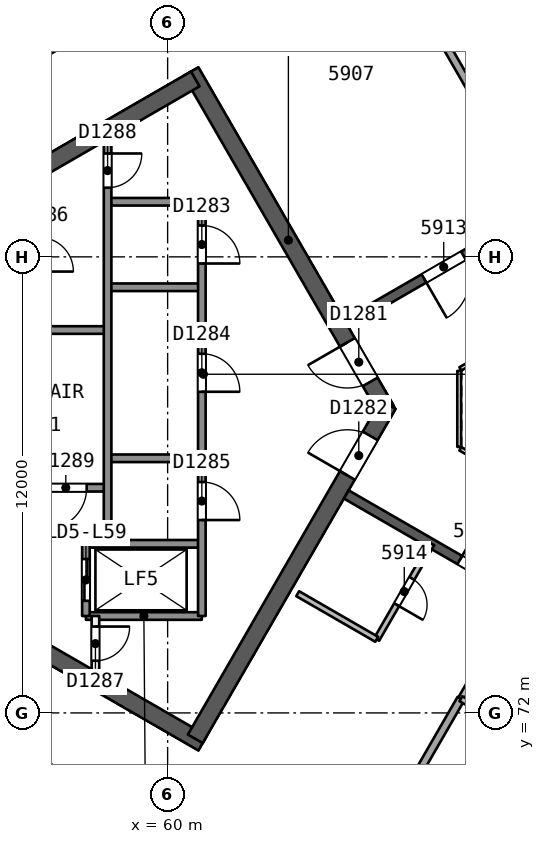
"""IFC4 building model, lengths in metres.
Left out: names, types, materials, properties, quantities, classifications, styles, units other than length and angle.
Written with IfcOpenShell. Run it as: python <this file> out.ifc"""

import sys

from ifc_helpers import new_model, si_unit, direction, frame, frame_2d, origin, place, context, subcontext, project, spatial, rectangle, extrude, element, fill, save


model = new_model("IFC4")
c1 = context("Model", 3, precision=1e-05, world=origin(), true_north=direction((0.0, 1.0)))
c2 = subcontext(c1, "Body", "Model", "MODEL_VIEW")
j1 = project(units=[si_unit("LENGTHUNIT", "METRE"), si_unit("PLANEANGLEUNIT", "RADIAN")], contexts=[c1])
p1 = place(None, origin())
s1 = spatial("IfcSite", under=j1, at=p1, CompositionType="ELEMENT")
p2 = place(p1, origin())
s2 = spatial("IfcBuilding", under=s1, at=p2, CompositionType="ELEMENT")
p3 = place(p2, frame((0.0, 0.0, 239.1)))
s3 = spatial("IfcBuildingStorey", under=s2, at=p3, CompositionType="ELEMENT", Elevation=239.1)
p4 = place(p3, frame((65.74, 80.0, 0.0), z_axis=(0.0, 0.0, 1.0), x_axis=(-0.499991857942, 0.866030104553, 0.0)))
e1 = element("IfcWall", 1, at=p4, inside=s3, PredefinedType="SHEAR", context=c2, shape_type="SweptSolid", body=[
    extrude(rectangle(XDim=10.25, YDim=0.45, at=frame_2d((5.125, 0.0))), origin(), (0.0, 0.0, 1.0), 3.7),
])
p5 = place(p4, frame((0.82, 0.0, 0.0)))
e2 = element("IfcOpeningElement", 2, at=p5, cuts=e1, PredefinedType="OPENING", context=c2, shape_type="SweptSolid", body=[
    extrude(rectangle(XDim=1.2, YDim=2.1, at=frame_2d((0.6, 1.05))), frame((0.0, 0.235, 0.0), z_axis=(0.0, -1.0, 0.0), x_axis=(1.0, 0.0, 0.0)), (0.0, 0.0, 1.0), 0.471),
])
p6 = place(p3, frame((60.728, 88.682, 0.0), z_axis=(0.0, 0.0, 1.0), x_axis=(-0.866021613849, -0.500006564303, 0.0)))
e3 = element("IfcWall", 3, at=p6, inside=s3, PredefinedType="SHEAR", context=c2, shape_type="SweptSolid", body=[
    extrude(rectangle(XDim=14.108, YDim=0.45, at=frame_2d((7.054, 0.0))), origin(), (0.0, 0.0, 1.0), 3.7),
])
p7 = place(p3, frame((48.622, 78.307, 0.0), z_axis=(0.0, 0.0, 1.0), x_axis=(0.86602701116, -0.499997215934, 0.0)))
e4 = element("IfcWall", 4, at=p7, inside=s3, PredefinedType="SHEAR", context=c2, shape_type="SweptSolid", body=[
    extrude(rectangle(XDim=14.204, YDim=0.45, at=frame_2d((7.102, 0.0))), origin(), (0.0, 0.0, 1.0), 3.7),
])
p8 = place(p3, frame((60.728, 71.318, 0.0), z_axis=(0.0, 0.0, 1.0), x_axis=(0.500012416173, 0.866018235185, 0.0)))
e5 = element("IfcWall", 5, at=p8, inside=s3, PredefinedType="SHEAR", context=c2, shape_type="SweptSolid", body=[
    extrude(rectangle(XDim=10.155, YDim=0.45, at=frame_2d((5.078, 0.0))), origin(), (0.0, 0.0, 1.0), 3.7),
])
p9 = place(p8, frame((8.005, 0.0, 0.0)))
e6 = element("IfcOpeningElement", 6, at=p9, cuts=e5, PredefinedType="OPENING", context=c2, shape_type="SweptSolid", body=[
    extrude(rectangle(XDim=1.2, YDim=2.1, at=frame_2d((0.6, 1.05))), frame((0.0, 0.235, 0.0), z_axis=(0.0, -1.0, 0.0), x_axis=(1.0, 0.0, 0.0)), (0.0, 0.0, 1.0), 0.471),
])
p10 = place(p3, frame((78.2, 90.046, 0.0), z_axis=(0.0, 0.0, 1.0), x_axis=(-0.866026492143, -0.499998114903, 0.0)))
e7 = element("IfcWall", 7, at=p10, inside=s3, PredefinedType="SHEAR", context=c2, shape_type="SweptSolid", body=[
    extrude(rectangle(XDim=15.588, YDim=0.25, at=frame_2d((7.794, 0.0))), origin(), (0.0, 0.0, 1.0), 3.3),
])
p11 = place(p10, frame((3.606, 0.0, 0.0)))
e8 = element("IfcOpeningElement", 8, at=p11, cuts=e7, PredefinedType="OPENING", context=c2, shape_type="SweptSolid", body=[
    extrude(rectangle(XDim=1.0, YDim=2.1, at=frame_2d((0.5, 1.05))), frame((0.0, 0.135, 0.0), z_axis=(0.0, -1.0, 0.0), x_axis=(1.0, 0.0, 0.0)), (0.0, 0.0, 1.0), 0.271),
])
p12 = place(p10, frame((8.315, 0.0, 0.0)))
e9 = element("IfcOpeningElement", 9, at=p12, cuts=e7, PredefinedType="OPENING", context=c2, shape_type="SweptSolid", body=[
    extrude(rectangle(XDim=1.1, YDim=2.1, at=frame_2d((0.55, 1.05))), frame((0.0, 0.135, 0.0), z_axis=(0.0, -1.0, 0.0), x_axis=(1.0, 0.0, 0.0)), (0.0, 0.0, 1.0), 0.271),
])
p13 = place(p10, frame((12.027, 0.0, 0.0)))
e10 = element("IfcOpeningElement", 10, at=p13, cuts=e7, PredefinedType="OPENING", context=c2, shape_type="SweptSolid", body=[
    extrude(rectangle(XDim=1.2, YDim=2.4, at=frame_2d((0.6, 1.2))), frame((0.0, 0.135, 0.0), z_axis=(0.0, -1.0, 0.0), x_axis=(1.0, 0.0, 0.0)), (0.0, 0.0, 1.0), 0.271),
])
p14 = place(p3, frame((64.7, 77.748, 0.0), z_axis=(0.0, 0.0, 1.0), x_axis=(0.866026492143, -0.499998114903, 0.0)))
e11 = element("IfcWall", 11, at=p14, inside=s3, PredefinedType="SHEAR", context=c2, shape_type="SweptSolid", body=[
    extrude(rectangle(XDim=15.588, YDim=0.25, at=frame_2d((7.794, 0.0))), origin(), (0.0, 0.0, 1.0), 3.3),
])
p15 = place(p14, frame((3.45, 0.0, 0.0)))
e12 = element("IfcOpeningElement", 12, at=p15, cuts=e11, PredefinedType="OPENING", context=c2, shape_type="SweptSolid", body=[
    extrude(rectangle(XDim=1.0, YDim=2.1, at=frame_2d((0.5, 1.05))), frame((0.0, 0.135, 0.0), z_axis=(0.0, -1.0, 0.0), x_axis=(1.0, 0.0, 0.0)), (0.0, 0.0, 1.0), 0.271),
])
p16 = place(p14, frame((8.315, 0.0, 0.0)))
e13 = element("IfcOpeningElement", 13, at=p16, cuts=e11, PredefinedType="OPENING", context=c2, shape_type="SweptSolid", body=[
    extrude(rectangle(XDim=1.1, YDim=2.1, at=frame_2d((0.55, 1.05))), frame((0.0, 0.135, 0.0), z_axis=(0.0, -1.0, 0.0), x_axis=(1.0, 0.0, 0.0)), (0.0, 0.0, 1.0), 0.271),
])
p17 = place(p14, frame((10.827, 0.0, 0.0)))
e14 = element("IfcOpeningElement", 14, at=p17, cuts=e11, PredefinedType="OPENING", context=c2, shape_type="SweptSolid", body=[
    extrude(rectangle(XDim=1.0, YDim=2.1, at=frame_2d((0.5, 1.05))), frame((0.0, 0.135, 0.0), z_axis=(0.0, -1.0, 0.0), x_axis=(1.0, 0.0, 0.0)), (0.0, 0.0, 1.0), 0.271),
])
p18 = place(p3, frame((64.815, 93.899, 0.0), z_axis=(0.0, 0.0, 1.0), x_axis=(0.50001112685, -0.866018979599, 0.0)))
e15 = element("IfcWall", 15, at=p18, inside=s3, PredefinedType="PARTITIONING", context=c2, shape_type="SweptSolid", body=[
    extrude(rectangle(XDim=10.03, YDim=0.2, at=frame_2d((5.015, 0.0))), origin(), (0.0, 0.0, 1.0), 3.3),
])
p19 = place(p3, frame((66.952, 76.448, 0.0), z_axis=(0.0, 0.0, 1.0), x_axis=(-0.499987231761, -0.866032775405, 0.0)))
e16 = element("IfcWall", 16, at=p19, inside=s3, PredefinedType="PARTITIONING", context=c2, shape_type="SweptSolid", body=[
    extrude(rectangle(XDim=2.9, YDim=0.15, at=frame_2d((1.45, 0.0))), origin(), (0.0, 0.0, 1.0), 3.3),
])
p20 = place(p19, frame((1.05, 0.0, 0.0)))
e17 = element("IfcOpeningElement", 17, at=p20, cuts=e16, PredefinedType="OPENING", context=c2, shape_type="SweptSolid", body=[
    extrude(rectangle(XDim=0.8, YDim=2.1, at=frame_2d((0.4, 1.05))), frame((0.0, 0.085, 0.0), z_axis=(0.0, -1.0, 0.0), x_axis=(1.0, 0.0, 0.0)), (0.0, 0.0, 1.0), 0.171),
])
p21 = place(p3, frame((65.502, 73.937, 0.0), z_axis=(0.0, 0.0, 1.0), x_axis=(-0.865994240961, 0.500053971709, 0.0)))
e18 = element("IfcWall", 18, at=p21, inside=s3, PredefinedType="PARTITIONING", context=c2, shape_type="SweptSolid", body=[
    extrude(rectangle(XDim=2.401, YDim=0.15, at=frame_2d((1.201, 0.0))), origin(), (0.0, 0.0, 1.0), 3.3),
])
p22 = place(p3, frame((64.275, 66.413, 0.0), z_axis=(0.0, 0.0, 1.0), x_axis=(0.500015178307, 0.866016640408, 0.0)))
e19 = element("IfcWall", 19, at=p22, inside=s3, PredefinedType="PARTITIONING", context=c2, shape_type="SweptSolid", body=[
    extrude(rectangle(XDim=6.883, YDim=0.2, at=frame_2d((3.441, 0.0))), origin(), (0.0, 0.0, 1.0), 3.3),
])
p23 = place(p3, frame((67.717, 72.373, 0.0), z_axis=(0.0, 0.0, 1.0), x_axis=(0.500002266011, 0.866024095498, 0.0)))
e20 = element("IfcWall", 20, at=p23, inside=s3, PredefinedType="PARTITIONING", context=c2, shape_type="SweptSolid", body=[
    extrude(rectangle(XDim=3.147, YDim=0.15, at=frame_2d((1.573, 0.0))), origin(), (0.0, 0.0, 1.0), 3.3),
])
p24 = place(p3, frame((70.111, 70.991, 0.0), z_axis=(0.0, 0.0, 1.0), x_axis=(-0.866050310653, 0.499956857557, 0.0)))
e21 = element("IfcWall", 21, at=p24, inside=s3, PredefinedType="PARTITIONING", context=c2, shape_type="SweptSolid", body=[
    extrude(rectangle(XDim=2.765, YDim=0.15, at=frame_2d((1.382, 0.0))), origin(), (0.0, 0.0, 1.0), 3.3),
])
p25 = place(p3, frame((44.845, 82.542, 0.0), z_axis=(0.0, 0.0, 1.0), x_axis=(0.866025459945, 0.499999902727, 0.0)))
e22 = element("IfcWall", 22, at=p25, inside=s3, PredefinedType="SOLIDWALL", context=c2, shape_type="SweptSolid", body=[
    extrude(rectangle(XDim=49.688, YDim=0.3, at=frame_2d((24.844, 0.0))), origin(), (0.0, 0.0, 1.0), 3.3),
])
p26 = place(p25, frame((23.8, 0.0, 0.0)))
e23 = element("IfcOpeningElement", 23, at=p26, cuts=e22, PredefinedType="OPENING", context=c2, shape_type="SweptSolid", body=[
    extrude(rectangle(XDim=2.4, YDim=2.4, at=frame_2d((1.2, 1.2))), frame((0.0, 0.161, 0.0), z_axis=(0.0, -1.0, 0.0), x_axis=(1.0, 0.0, 0.0)), (0.0, 0.0, 1.0), 0.321),
])
p27 = place(p25, frame((10.243, 0.0, 0.0)))
e24 = element("IfcOpeningElement", 24, at=p27, cuts=e22, PredefinedType="OPENING", context=c2, shape_type="SweptSolid", body=[
    extrude(rectangle(XDim=2.4, YDim=2.4, at=frame_2d((1.2, 1.2))), frame((0.0, 0.161, 0.0), z_axis=(0.0, -1.0, 0.0), x_axis=(1.0, 0.0, 0.0)), (0.0, 0.0, 1.0), 0.321),
])
p28 = place(p25, frame((37.201, 0.0, 0.0)))
e25 = element("IfcOpeningElement", 25, at=p28, cuts=e22, PredefinedType="OPENING", context=c2, shape_type="SweptSolid", body=[
    extrude(rectangle(XDim=2.4, YDim=2.4, at=frame_2d((1.2, 1.2))), frame((0.0, 0.161, 0.0), z_axis=(0.0, -1.0, 0.0), x_axis=(1.0, 0.0, 0.0)), (0.0, 0.0, 1.0), 0.321),
])
p29 = place(p3, frame((87.876, 52.614, 0.0), z_axis=(0.0, 0.0, 1.0), x_axis=(-0.866025459945, 0.499999902727, 0.0)))
e26 = element("IfcWall", 26, at=p29, inside=s3, PredefinedType="SOLIDWALL", context=c2, shape_type="SweptSolid", body=[
    extrude(rectangle(XDim=49.688, YDim=0.3, at=frame_2d((24.844, 0.0))), origin(), (0.0, 0.0, 1.0), 3.3),
])
p30 = place(p29, frame((23.956, 0.0, 0.0)))
e27 = element("IfcOpeningElement", 27, at=p30, cuts=e26, PredefinedType="OPENING", context=c2, shape_type="SweptSolid", body=[
    extrude(rectangle(XDim=2.4, YDim=2.4, at=frame_2d((1.2, 1.2))), frame((0.0, 0.161, 0.0), z_axis=(0.0, -1.0, 0.0), x_axis=(1.0, 0.0, 0.0)), (0.0, 0.0, 1.0), 0.321),
])
p31 = place(p29, frame((37.357, 0.0, 0.0)))
e28 = element("IfcOpeningElement", 28, at=p31, cuts=e26, PredefinedType="OPENING", context=c2, shape_type="SweptSolid", body=[
    extrude(rectangle(XDim=2.4, YDim=2.4, at=frame_2d((1.2, 1.2))), frame((0.0, 0.161, 0.0), z_axis=(0.0, -1.0, 0.0), x_axis=(1.0, 0.0, 0.0)), (0.0, 0.0, 1.0), 0.321),
])
p32 = place(p29, frame((10.243, 0.0, 0.0)))
e29 = element("IfcOpeningElement", 29, at=p32, cuts=e26, PredefinedType="OPENING", context=c2, shape_type="SweptSolid", body=[
    extrude(rectangle(XDim=2.4, YDim=2.4, at=frame_2d((1.2, 1.2))), frame((0.0, 0.161, 0.0), z_axis=(0.0, -1.0, 0.0), x_axis=(1.0, 0.0, 0.0)), (0.0, 0.0, 1.0), 0.321),
])
for number, where, z_axis, x_axis in (
    (30, (60.9, 85.45, 0.0), (0.0, 0.0, 1.0), (-1.0, 0.0, 0.0)),
    (31, (60.9, 83.2, 0.0), (0.0, 0.0, 1.0), (-1.0, 0.0, 0.0)),
):
    element("IfcWall", number, at=place(p3, frame(where, z_axis=z_axis, x_axis=x_axis)), inside=s3, PredefinedType="SOLIDWALL", context=c2, shape_type="SweptSolid", body=[
        extrude(rectangle(XDim=2.48, YDim=0.2, at=frame_2d((1.24, 0.0))), origin(), (0.0, 0.0, 1.0), 3.3),
    ])
p33 = place(p3, frame((58.42, 82.075, 0.0), z_axis=(0.0, 0.0, 1.0), x_axis=(-1.0, 0.0, 0.0)))
e32 = element("IfcWall", 32, at=p33, inside=s3, PredefinedType="SOLIDWALL", context=c2, shape_type="SweptSolid", body=[
    extrude(rectangle(XDim=7.7, YDim=0.2, at=frame_2d((3.85, 0.0))), origin(), (0.0, 0.0, 1.0), 3.3),
])
p34 = place(p3, frame((60.9, 78.7, 0.0), z_axis=(0.0, 0.0, 1.0), x_axis=(-1.0, 0.0, 0.0)))
e33 = element("IfcWall", 33, at=p34, inside=s3, PredefinedType="SOLIDWALL", context=c2, shape_type="SweptSolid", body=[
    extrude(rectangle(XDim=2.48, YDim=0.2, at=frame_2d((1.24, 0.0))), origin(), (0.0, 0.0, 1.0), 3.3),
])
p35 = place(p3, frame((58.42, 77.925, 0.0), z_axis=(0.0, 0.0, 1.0), x_axis=(-1.0, 0.0, 0.0)))
e34 = element("IfcWall", 34, at=p35, inside=s3, PredefinedType="SOLIDWALL", context=c2, shape_type="SweptSolid", body=[
    extrude(rectangle(XDim=7.7, YDim=0.2, at=frame_2d((3.85, 0.0))), origin(), (0.0, 0.0, 1.0), 3.3),
])
p36 = place(p35, frame((0.55, 0.0, 0.0)))
e35 = element("IfcOpeningElement", 35, at=p36, cuts=e34, PredefinedType="OPENING", context=c2, shape_type="SweptSolid", body=[
    extrude(rectangle(XDim=1.1, YDim=2.1, at=frame_2d((0.55, 1.05))), frame((0.0, 0.11, 0.0), z_axis=(0.0, -1.0, 0.0), x_axis=(1.0, 0.0, 0.0)), (0.0, 0.0, 1.0), 0.221),
])
for number, where, z_axis, x_axis in (
    (36, (60.9, 76.45, 0.0), (0.0, 0.0, 1.0), (-1.0, 0.0, 0.0)),
    (37, (60.9, 74.55, 0.0), (0.0, 0.0, 1.0), (-1.0, 0.0, 0.0)),
):
    element("IfcWall", number, at=place(p3, frame(where, z_axis=z_axis, x_axis=x_axis)), inside=s3, PredefinedType="SOLIDWALL", context=c2, shape_type="SweptSolid", body=[
        extrude(rectangle(XDim=3.05, YDim=0.2, at=frame_2d((1.525, 0.0))), origin(), (0.0, 0.0, 1.0), 3.3),
    ])
p37 = place(p3, frame((60.9, 85.45, 0.0), z_axis=(0.0, 0.0, 1.0), x_axis=(0.0, -1.0, 0.0)))
e38 = element("IfcWall", 38, at=p37, inside=s3, PredefinedType="SOLIDWALL", context=c2, shape_type="SweptSolid", body=[
    extrude(rectangle(XDim=10.9, YDim=0.2, at=frame_2d((5.45, 0.0))), origin(), (0.0, 0.0, 1.0), 3.3),
])
p38 = place(p37, frame((0.625, 0.0, 0.0)))
e39 = element("IfcOpeningElement", 39, at=p38, cuts=e38, PredefinedType="OPENING", context=c2, shape_type="SweptSolid", body=[
    extrude(rectangle(XDim=1.0, YDim=2.1, at=frame_2d((0.5, 1.05))), frame((0.0, 0.11, 0.0), z_axis=(0.0, -1.0, 0.0), x_axis=(1.0, 0.0, 0.0)), (0.0, 0.0, 1.0), 0.221),
])
p39 = place(p37, frame((4.0, 0.0, 0.0)))
e40 = element("IfcOpeningElement", 40, at=p39, cuts=e38, PredefinedType="OPENING", context=c2, shape_type="SweptSolid", body=[
    extrude(rectangle(XDim=1.0, YDim=2.1, at=frame_2d((0.5, 1.05))), frame((0.0, 0.11, 0.0), z_axis=(0.0, -1.0, 0.0), x_axis=(1.0, 0.0, 0.0)), (0.0, 0.0, 1.0), 0.221),
])
p40 = place(p37, frame((7.375, 0.0, 0.0)))
e41 = element("IfcOpeningElement", 41, at=p40, cuts=e38, PredefinedType="OPENING", context=c2, shape_type="SweptSolid", body=[
    extrude(rectangle(XDim=1.0, YDim=2.1, at=frame_2d((0.5, 1.05))), frame((0.0, 0.11, 0.0), z_axis=(0.0, -1.0, 0.0), x_axis=(1.0, 0.0, 0.0)), (0.0, 0.0, 1.0), 0.221),
])
p41 = place(p3, frame((58.42, 87.09, 0.0), z_axis=(0.0, 0.0, 1.0), x_axis=(0.0, -1.0, 0.0)))
e42 = element("IfcWall", 42, at=p41, inside=s3, PredefinedType="SOLIDWALL", context=c2, shape_type="SweptSolid", body=[
    extrude(rectangle(XDim=10.64, YDim=0.2, at=frame_2d((5.32, 0.0))), origin(), (0.0, 0.0, 1.0), 3.3),
])
p42 = place(p41, frame((0.37, 0.0, 0.0)))
e43 = element("IfcOpeningElement", 43, at=p42, cuts=e42, PredefinedType="OPENING", context=c2, shape_type="SweptSolid", body=[
    extrude(rectangle(XDim=0.9, YDim=2.1, at=frame_2d((0.45, 1.05))), frame((0.0, 0.11, 0.0), z_axis=(0.0, -1.0, 0.0), x_axis=(1.0, 0.0, 0.0)), (0.0, 0.0, 1.0), 0.221),
])
p43 = place(p3, frame((58.1, 74.55, 0.0), z_axis=(0.0, 0.0, 1.0), x_axis=(0.0, -1.0, 0.0)))
e44 = element("IfcWall", 44, at=p43, inside=s3, PredefinedType="PARTITIONING", context=c2, shape_type="SweptSolid", body=[
    extrude(rectangle(XDim=1.455, YDim=0.2, at=frame_2d((0.728, 0.0))), origin(), (0.0, 0.0, 1.0), 3.3),
])
p44 = place(p43, frame((0.278, 0.0, 0.0)))
e45 = element("IfcOpeningElement", 45, at=p44, cuts=e44, PredefinedType="OPENING", context=c2, shape_type="SweptSolid", body=[
    extrude(rectangle(XDim=0.9, YDim=2.1, at=frame_2d((0.45, 1.05))), frame((0.0, 0.11, 0.0), z_axis=(0.0, -1.0, 0.0), x_axis=(1.0, 0.0, 0.0)), (0.0, 0.0, 1.0), 0.221),
])
p45 = place(p3, frame((57.85, 76.45, 0.0), z_axis=(0.0, 0.0, 1.0), x_axis=(0.0, -1.0, 0.0)))
e46 = element("IfcWall", 46, at=p45, inside=s3, PredefinedType="SOLIDWALL", context=c2, shape_type="SweptSolid", body=[
    extrude(rectangle(XDim=1.9, YDim=0.2, at=frame_2d((0.95, 0.0))), origin(), (0.0, 0.0, 1.0), 3.3),
])
p46 = place(p45, frame((0.4, 0.0, 0.0)))
e47 = element("IfcOpeningElement", 47, at=p46, cuts=e46, PredefinedType="OPENING", context=c2, shape_type="SweptSolid", body=[
    extrude(rectangle(XDim=1.1, YDim=2.1, at=frame_2d((0.55, 1.05))), frame((0.0, 0.11, 0.0), z_axis=(0.0, -1.0, 0.0), x_axis=(1.0, 0.0, 0.0)), (0.0, 0.0, 1.0), 0.221),
])
p47 = place(p3, frame((77.738, 86.846, 0.0), z_axis=(0.0, 0.0, 1.0), x_axis=(-0.866026658274, -0.499997827154, 0.0)))
e48 = element("IfcWall", 48, at=p47, inside=s3, PredefinedType="PARTITIONING", context=c2, shape_type="SweptSolid", body=[
    extrude(rectangle(XDim=11.588, YDim=0.1, at=frame_2d((5.794, 0.0))), origin(), (0.0, 0.0, 1.0), 3.3),
])
p48 = place(p3, frame((67.672, 81.0, 0.0), z_axis=(0.0, 0.0, 1.0), x_axis=(0.0, -1.0, 0.0)))
e49 = element("IfcWall", 49, at=p48, inside=s3, PredefinedType="PARTITIONING", context=c2, shape_type="SweptSolid", body=[
    extrude(rectangle(XDim=2.0, YDim=0.1, at=frame_2d((1.0, 0.0))), origin(), (0.0, 0.0, 1.0), 3.3),
])
p49 = place(p3, frame((67.702, 78.948, 0.0), z_axis=(0.0, 0.0, 1.0), x_axis=(0.866026658274, -0.499997827154, 0.0)))
e50 = element("IfcWall", 50, at=p49, inside=s3, PredefinedType="PARTITIONING", context=c2, shape_type="SweptSolid", body=[
    extrude(rectangle(XDim=11.588, YDim=0.1, at=frame_2d((5.794, 0.0))), origin(), (0.0, 0.0, 1.0), 3.3),
])
p50 = place(p13, origin())
e51 = element("IfcDoor", 51, at=p50, inside=s3, OperationType="SINGLE_SWING_RIGHT", PredefinedType="NOTDEFINED", context=c2, shape_type="SweptSolid", body=[
    extrude(rectangle(XDim=1.2, YDim=2.4, at=frame_2d((0.6, 1.2))), frame((0.0, 0.025, 0.0), z_axis=(0.0, -1.0, 0.0), x_axis=(1.0, 0.0, 0.0)), (0.0, 0.0, 1.0), 0.05),
])
fill(e10, e51)
p51 = place(p20, origin())
e52 = element("IfcDoor", 52, at=p51, inside=s3, OperationType="SINGLE_SWING_RIGHT", PredefinedType="NOTDEFINED", context=c2, shape_type="SweptSolid", body=[
    extrude(rectangle(XDim=0.8, YDim=2.1, at=frame_2d((0.4, 1.05))), frame((0.0, 0.025, 0.0), z_axis=(0.0, -1.0, 0.0), x_axis=(1.0, 0.0, 0.0)), (0.0, 0.0, 1.0), 0.05),
])
fill(e17, e52)
p52 = place(p15, origin())
e53 = element("IfcDoor", 53, at=p52, inside=s3, OperationType="SINGLE_SWING_LEFT", PredefinedType="NOTDEFINED", context=c2, shape_type="SweptSolid", body=[
    extrude(rectangle(XDim=1.0, YDim=2.1, at=frame_2d((0.5, 1.05))), frame((0.0, 0.025, 0.0), z_axis=(0.0, -1.0, 0.0), x_axis=(1.0, 0.0, 0.0)), (0.0, 0.0, 1.0), 0.05),
])
fill(e12, e53)
p53 = place(p5, origin())
e54 = element("IfcDoor", 54, at=p53, inside=s3, OperationType="SINGLE_SWING_RIGHT", PredefinedType="NOTDEFINED", context=c2, shape_type="SweptSolid", body=[
    extrude(rectangle(XDim=1.2, YDim=2.1, at=frame_2d((0.6, 1.05))), frame((0.0, 0.025, 0.0), z_axis=(0.0, -1.0, 0.0), x_axis=(1.0, 0.0, 0.0)), (0.0, 0.0, 1.0), 0.05),
])
fill(e2, e54)
p54 = place(p9, origin())
e55 = element("IfcDoor", 55, at=p54, inside=s3, OperationType="SINGLE_SWING_LEFT", PredefinedType="NOTDEFINED", context=c2, shape_type="SweptSolid", body=[
    extrude(rectangle(XDim=1.2, YDim=2.1, at=frame_2d((0.6, 1.05))), frame((0.0, 0.025, 0.0), z_axis=(0.0, -1.0, 0.0), x_axis=(1.0, 0.0, 0.0)), (0.0, 0.0, 1.0), 0.05),
])
fill(e6, e55)
p55 = place(p46, origin())
e56 = element("IfcDoor", 56, at=p55, inside=s3, OperationType="SLIDING_TO_RIGHT", PredefinedType="NOTDEFINED", context=c2, shape_type="SweptSolid", body=[
    extrude(rectangle(XDim=1.1, YDim=2.1, at=frame_2d((0.55, 1.05))), frame((0.0, 0.025, 0.0), z_axis=(0.0, -1.0, 0.0), x_axis=(1.0, 0.0, 0.0)), (0.0, 0.0, 1.0), 0.05),
])
fill(e47, e56)
p56 = place(p38, origin())
e57 = element("IfcDoor", 57, at=p56, inside=s3, OperationType="SINGLE_SWING_RIGHT", PredefinedType="NOTDEFINED", context=c2, shape_type="SweptSolid", body=[
    extrude(rectangle(XDim=1.0, YDim=2.1, at=frame_2d((0.5, 1.05))), frame((0.0, 0.025, 0.0), z_axis=(0.0, -1.0, 0.0), x_axis=(1.0, 0.0, 0.0)), (0.0, 0.0, 1.0), 0.05),
])
fill(e39, e57)
p57 = place(p39, origin())
e58 = element("IfcDoor", 58, at=p57, inside=s3, OperationType="SINGLE_SWING_RIGHT", PredefinedType="NOTDEFINED", context=c2, shape_type="SweptSolid", body=[
    extrude(rectangle(XDim=1.0, YDim=2.1, at=frame_2d((0.5, 1.05))), frame((0.0, 0.025, 0.0), z_axis=(0.0, -1.0, 0.0), x_axis=(1.0, 0.0, 0.0)), (0.0, 0.0, 1.0), 0.05),
])
fill(e40, e58)
p58 = place(p40, origin())
e59 = element("IfcDoor", 59, at=p58, inside=s3, OperationType="SINGLE_SWING_RIGHT", PredefinedType="NOTDEFINED", context=c2, shape_type="SweptSolid", body=[
    extrude(rectangle(XDim=1.0, YDim=2.1, at=frame_2d((0.5, 1.05))), frame((0.0, 0.025, 0.0), z_axis=(0.0, -1.0, 0.0), x_axis=(1.0, 0.0, 0.0)), (0.0, 0.0, 1.0), 0.05),
])
fill(e41, e59)
p59 = place(p44, origin())
e60 = element("IfcDoor", 60, at=p59, inside=s3, OperationType="SINGLE_SWING_LEFT", PredefinedType="NOTDEFINED", context=c2, shape_type="SweptSolid", body=[
    extrude(rectangle(XDim=0.9, YDim=2.1, at=frame_2d((0.45, 1.05))), frame((0.0, 0.025, 0.0), z_axis=(0.0, -1.0, 0.0), x_axis=(1.0, 0.0, 0.0)), (0.0, 0.0, 1.0), 0.05),
])
fill(e45, e60)
p60 = place(p42, origin())
e61 = element("IfcDoor", 61, at=p60, inside=s3, OperationType="SINGLE_SWING_LEFT", PredefinedType="NOTDEFINED", context=c2, shape_type="SweptSolid", body=[
    extrude(rectangle(XDim=0.9, YDim=2.1, at=frame_2d((0.45, 1.05))), frame((0.0, 0.025, 0.0), z_axis=(0.0, -1.0, 0.0), x_axis=(1.0, 0.0, 0.0)), (0.0, 0.0, 1.0), 0.05),
])
fill(e43, e61)
p61 = place(p36, origin())
e62 = element("IfcDoor", 62, at=p61, inside=s3, OperationType="SINGLE_SWING_RIGHT", PredefinedType="NOTDEFINED", context=c2, shape_type="SweptSolid", body=[
    extrude(rectangle(XDim=1.1, YDim=2.1, at=frame_2d((0.55, 1.05))), frame((0.0, 0.025, 0.0), z_axis=(0.0, -1.0, 0.0), x_axis=(1.0, 0.0, 0.0)), (0.0, 0.0, 1.0), 0.05),
])
fill(e35, e62)
save(model, sys.argv[1])
